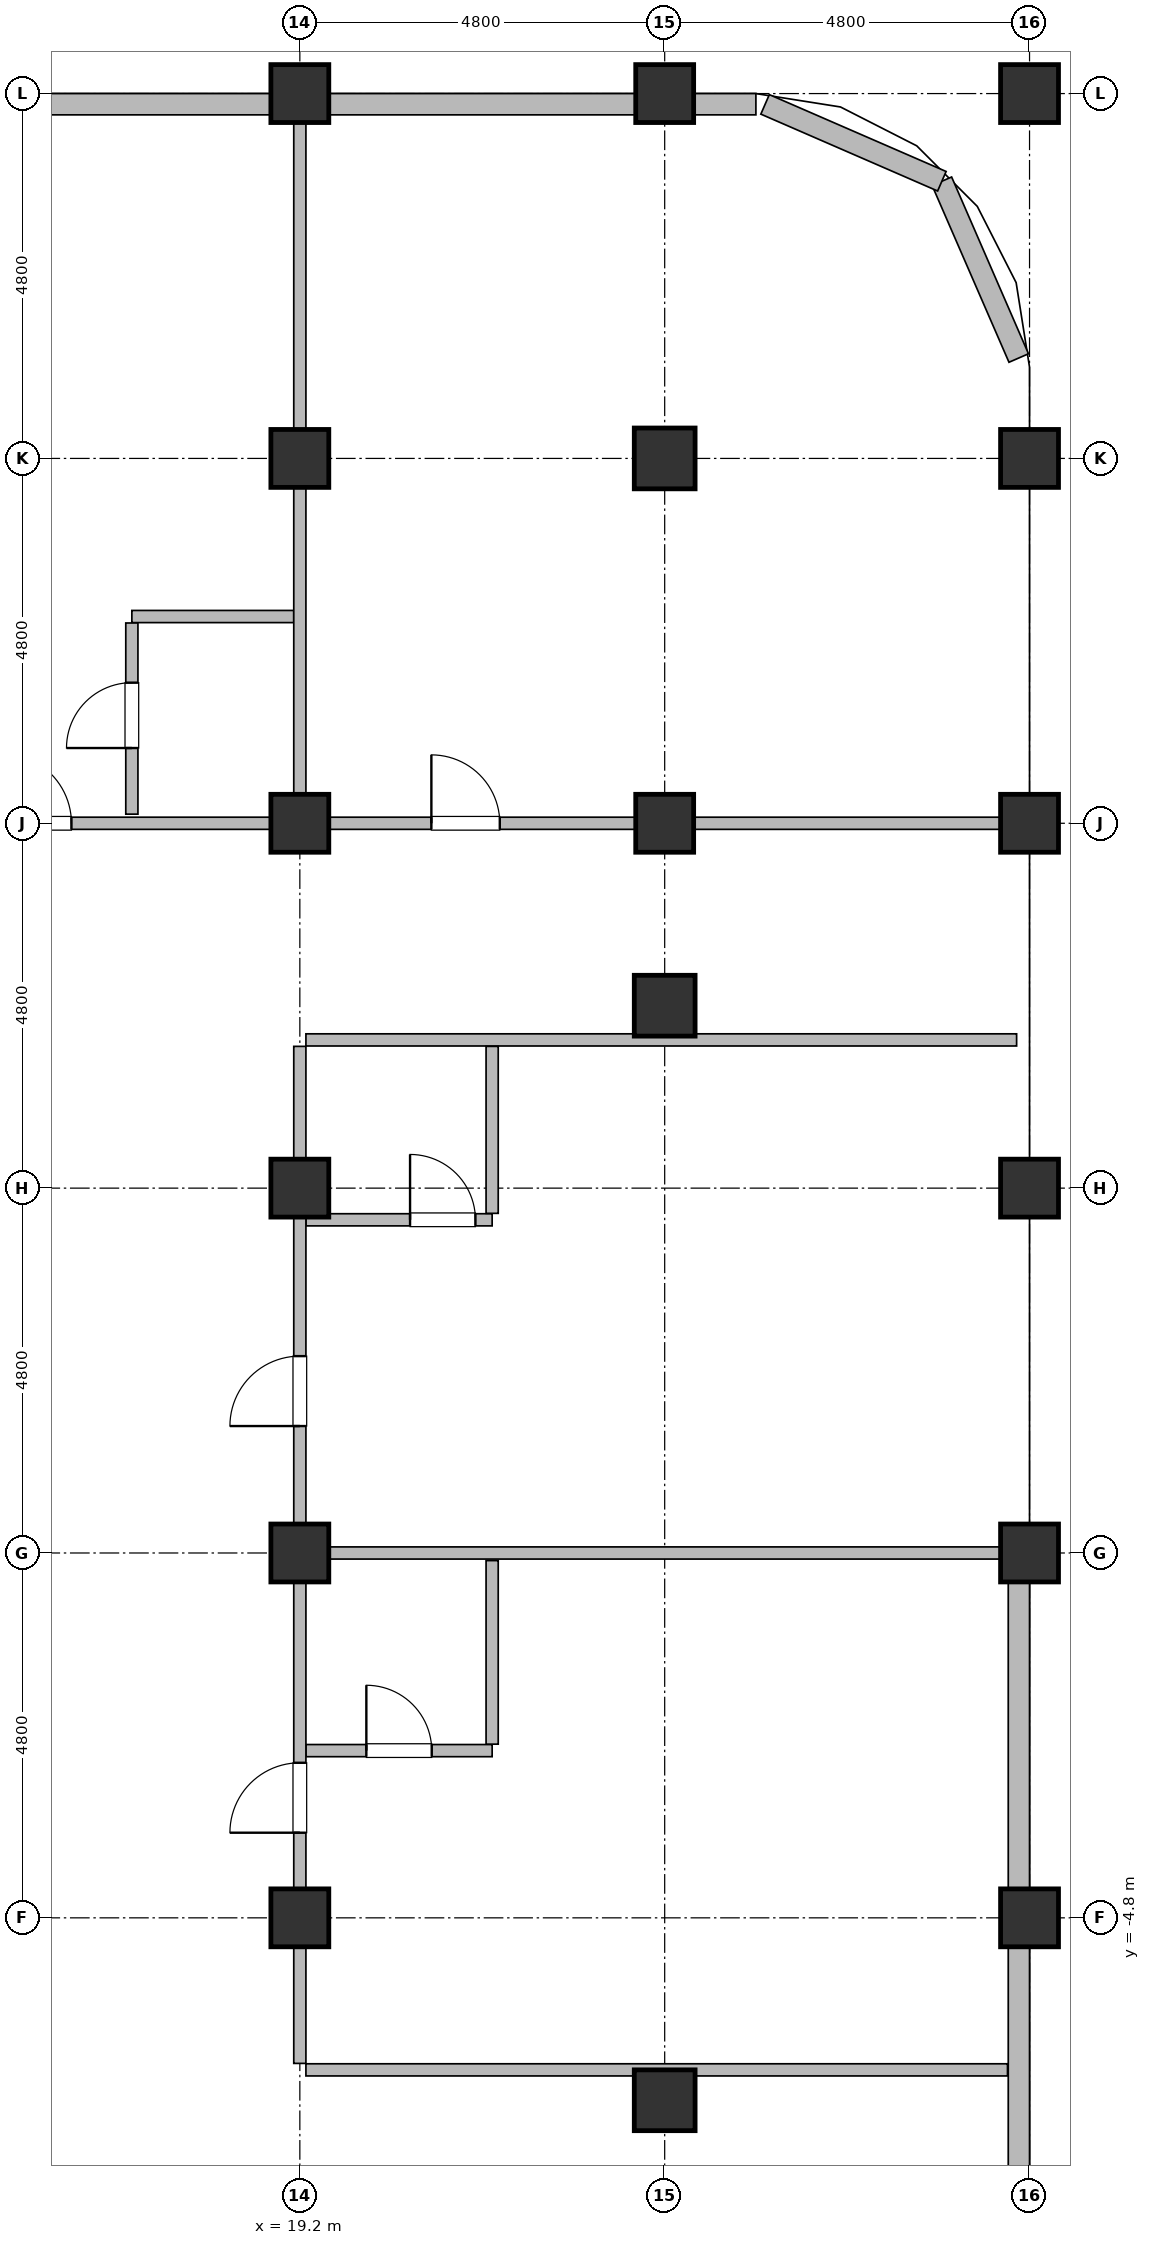
"""IFC4 building model, lengths in metres.
Left out: names, types, materials, properties, quantities, classifications, styles, units other than length and angle.
Written with IfcOpenShell. Run it as: python <this file> out.ifc"""

import sys

from ifc_helpers import new_model, si_unit, direction, frame, frame_2d, origin, origin_2d, place, context, subcontext, project, spatial, rectangle, hollow_rectangle, hollow_circle, extrude, element, fill, save


model = new_model("IFC4")
c1 = context("Model", 3, precision=1e-05, world=origin(), true_north=direction((0.0, 1.0)))
c2 = subcontext(c1, "Body", "Model", "MODEL_VIEW")
j1 = project(units=[si_unit("LENGTHUNIT", "METRE"), si_unit("PLANEANGLEUNIT", "RADIAN")], contexts=[c1])
p1 = place(None, origin())
s1 = spatial("IfcSite", under=j1, at=p1, CompositionType="ELEMENT")
p2 = place(p1, origin())
s2 = spatial("IfcBuilding", under=s1, at=p2, CompositionType="ELEMENT")
p3 = place(p2, frame((0.0, 0.0, 48.5)))
s3 = spatial("IfcBuildingStorey", under=s2, at=p3, CompositionType="ELEMENT", Elevation=48.5)
for number, where, z_axis, x_axis in (
    (1, (19.2, -4.8, 0.0), (0.0, 0.0, 1.0), (1.0, 0.0, 0.0)),
    (2, (19.2, 0.0, 0.0), (0.0, 0.0, 1.0), (1.0, 0.0, 0.0)),
    (3, (19.2, 4.8, 0.0), (0.0, 0.0, 1.0), (1.0, 0.0, 0.0)),
    (4, (19.2, 9.6, 0.0), (0.0, 0.0, 1.0), (1.0, 0.0, 0.0)),
    (5, (19.2, 14.4, 0.0), (0.0, 0.0, 1.0), (1.0, 0.0, 0.0)),
    (6, (19.2, 19.2, 0.0), (0.0, 0.0, 1.0), (1.0, 0.0, 0.0)),
):
    element("IfcColumn", number, at=place(p3, frame(where, z_axis=z_axis, x_axis=x_axis)), inside=s3, PredefinedType="COLUMN", context=c2, shape_type="SweptSolid", body=[
        extrude(hollow_circle(Radius=0.381, WallThickness=0.032, at=origin_2d()), origin(), (0.0, 0.0, 1.0), 3.7),
    ])
for number, where, z_axis, x_axis in (
    (7, (24.0, -7.2, 0.0), (0.0, 0.0, 1.0), (1.0, 0.0, 0.0)),
    (8, (24.0, 7.2, 0.0), (0.0, 0.0, 1.0), (1.0, 0.0, 0.0)),
):
    element("IfcColumn", number, at=place(p3, frame(where, z_axis=z_axis, x_axis=x_axis)), inside=s3, PredefinedType="COLUMN", context=c2, shape_type="SweptSolid", body=[
        extrude(hollow_rectangle(XDim=0.8, YDim=0.8, WallThickness=0.036, at=origin_2d()), origin(), (0.0, 0.0, 1.0), 3.7),
    ])
p4 = place(p3, frame((24.0, 9.6, 0.0), z_axis=(0.0, 0.0, 1.0), x_axis=(1.0, 0.0, 0.0)))
e9 = element("IfcColumn", 9, at=p4, inside=s3, PredefinedType="COLUMN", context=c2, shape_type="SweptSolid", body=[
    extrude(hollow_circle(Radius=0.381, WallThickness=0.032, at=origin_2d()), origin(), (0.0, 0.0, 1.0), 3.7),
])
p5 = place(p3, frame((24.0, 14.4, 0.0), z_axis=(0.0, 0.0, 1.0), x_axis=(1.0, 0.0, 0.0)))
e10 = element("IfcColumn", 10, at=p5, inside=s3, PredefinedType="COLUMN", context=c2, shape_type="SweptSolid", body=[
    extrude(hollow_rectangle(XDim=0.8, YDim=0.8, WallThickness=0.036, at=origin_2d()), origin(), (0.0, 0.0, 1.0), 3.7),
])
for number, where, z_axis, x_axis in (
    (11, (24.0, 19.2, 0.0), (0.0, 0.0, 1.0), (1.0, 0.0, 0.0)),
    (12, (28.8, -4.8, 0.0), (0.0, 0.0, 1.0), (1.0, 0.0, 0.0)),
    (13, (28.8, 0.0, 0.0), (0.0, 0.0, 1.0), (1.0, 0.0, 0.0)),
    (14, (28.8, 4.8, 0.0), (0.0, 0.0, 1.0), (1.0, 0.0, 0.0)),
    (15, (28.8, 9.6, 0.0), (0.0, 0.0, 1.0), (1.0, 0.0, 0.0)),
    (16, (28.8, 14.4, 0.0), (0.0, 0.0, 1.0), (1.0, 0.0, 0.0)),
    (17, (28.8, 19.2, 0.0), (0.0, 0.0, 1.0), (1.0, 0.0, 0.0)),
):
    element("IfcColumn", number, at=place(p3, frame(where, z_axis=z_axis, x_axis=x_axis)), inside=s3, PredefinedType="COLUMN", context=c2, shape_type="SweptSolid", body=[
        extrude(hollow_circle(Radius=0.381, WallThickness=0.032, at=origin_2d()), origin(), (0.0, 0.0, 1.0), 3.7),
    ])
p6 = place(p3, frame((28.658, 15.721, 0.0), z_axis=(0.0, 0.0, 1.0), x_axis=(-0.398792985289, 0.917040977756, 0.0)))
e18 = element("IfcWall", 18, at=p6, inside=s3, PredefinedType="SOLIDWALL", context=c2, shape_type="SweptSolid", body=[
    extrude(rectangle(XDim=2.536, YDim=0.28, at=frame_2d((1.268, 0.0))), origin(), (0.0, 0.0, 1.0), 2.82),
])
p7 = place(p3, frame((27.646, 18.047, 0.0), z_axis=(0.0, 0.0, 1.0), x_axis=(-0.917060872934, 0.398747232384, 0.0)))
e19 = element("IfcWall", 19, at=p7, inside=s3, PredefinedType="SOLIDWALL", context=c2, shape_type="SweptSolid", body=[
    extrude(rectangle(XDim=2.536, YDim=0.28, at=frame_2d((1.268, 0.0))), origin(), (0.0, 0.0, 1.0), 2.62),
])
p8 = place(p3, frame((4.75, 19.06, 0.0), z_axis=(0.0, 0.0, 1.0), x_axis=(1.0, 0.0, 0.0)))
e20 = element("IfcWall", 20, at=p8, inside=s3, PredefinedType="SOLIDWALL", context=c2, shape_type="SweptSolid", body=[
    extrude(rectangle(XDim=20.45, YDim=0.28, at=frame_2d((10.225, 0.0))), origin(), (0.0, 0.0, 1.0), 2.62),
])
p9 = place(p8, frame((6.35, 0.0, 0.75)))
e21 = element("IfcOpeningElement", 21, at=p9, cuts=e20, PredefinedType="OPENING", context=c2, shape_type="SweptSolid", body=[
    extrude(rectangle(XDim=1.8, YDim=1.7, at=frame_2d((0.9, 0.85))), frame((0.0, 0.155, 0.0), z_axis=(0.0, -1.0, 0.0), x_axis=(1.0, 0.0, 0.0)), (0.0, 0.0, 1.0), 0.31),
])
p10 = place(p8, frame((11.15, 0.0, 0.75)))
e22 = element("IfcOpeningElement", 22, at=p10, cuts=e20, PredefinedType="OPENING", context=c2, shape_type="SweptSolid", body=[
    extrude(rectangle(XDim=1.8, YDim=1.7, at=frame_2d((0.9, 0.85))), frame((0.0, 0.155, 0.0), z_axis=(0.0, -1.0, 0.0), x_axis=(1.0, 0.0, 0.0)), (0.0, 0.0, 1.0), 0.31),
])
p11 = place(p3, frame((28.66, -20.4, 0.0), z_axis=(0.0, 0.0, 1.0), x_axis=(0.0, 1.0, 0.0)))
e23 = element("IfcWall", 23, at=p11, inside=s3, PredefinedType="SOLIDWALL", context=c2, shape_type="SweptSolid", body=[
    extrude(rectangle(XDim=20.38, YDim=0.28, at=frame_2d((10.19, 0.0))), origin(), (0.0, 0.0, 1.0), 2.12),
])
p12 = place(p11, frame((17.25, 0.0, 0.75)))
e24 = element("IfcOpeningElement", 24, at=p12, cuts=e23, PredefinedType="OPENING", context=c2, shape_type="SweptSolid", body=[
    extrude(rectangle(XDim=1.5, YDim=1.15, at=frame_2d((0.75, 0.575))), frame((0.0, 0.155, 0.0), z_axis=(0.0, -1.0, 0.0), x_axis=(1.0, 0.0, 0.0)), (0.0, 0.0, 1.0), 0.31),
])
p13 = place(p3, frame((19.28, -6.8, 0.0), z_axis=(0.0, 0.0, 1.0), x_axis=(1.0, 0.0, 0.0)))
e25 = element("IfcWall", 25, at=p13, inside=s3, PredefinedType="PARTITIONING", context=c2, shape_type="SweptSolid", body=[
    extrude(rectangle(XDim=9.23, YDim=0.16, at=frame_2d((4.615, 0.0))), origin(), (0.0, 0.0, 1.0), 2.62),
])
p14 = place(p3, frame((19.28, -2.6, 0.0), z_axis=(0.0, 0.0, 1.0), x_axis=(1.0, 0.0, 0.0)))
e26 = element("IfcWall", 26, at=p14, inside=s3, PredefinedType="PARTITIONING", context=c2, shape_type="SweptSolid", body=[
    extrude(rectangle(XDim=2.45, YDim=0.16, at=frame_2d((1.225, 0.0))), origin(), (0.0, 0.0, 1.0), 2.82),
])
p15 = place(p14, frame((0.795, 0.0, 0.0)))
e27 = element("IfcOpeningElement", 27, at=p15, cuts=e26, PredefinedType="OPENING", context=c2, shape_type="SweptSolid", body=[
    extrude(rectangle(XDim=0.86, YDim=2.1, at=frame_2d((0.43, 1.05))), frame((0.0, 0.095, 0.0), z_axis=(0.0, -1.0, 0.0), x_axis=(1.0, 0.0, 0.0)), (0.0, 0.0, 1.0), 0.19),
])
p16 = place(p3, frame((19.28, 0.0, 0.0), z_axis=(0.0, 0.0, 1.0), x_axis=(1.0, 0.0, 0.0)))
e28 = element("IfcWall", 28, at=p16, inside=s3, PredefinedType="PARTITIONING", context=c2, shape_type="SweptSolid", body=[
    extrude(rectangle(XDim=9.35, YDim=0.16, at=frame_2d((4.675, 0.0))), origin(), (0.0, 0.0, 1.0), 2.82),
])
p17 = place(p3, frame((19.28, 4.383, 0.0), z_axis=(0.0, 0.0, 1.0), x_axis=(1.0, 0.0, 0.0)))
e29 = element("IfcWall", 29, at=p17, inside=s3, PredefinedType="PARTITIONING", context=c2, shape_type="SweptSolid", body=[
    extrude(rectangle(XDim=2.45, YDim=0.16, at=frame_2d((1.225, 0.0))), origin(), (0.0, 0.0, 1.0), 2.82),
])
p18 = place(p17, frame((1.37, 0.0, 0.0)))
e30 = element("IfcOpeningElement", 30, at=p18, cuts=e29, PredefinedType="OPENING", context=c2, shape_type="SweptSolid", body=[
    extrude(rectangle(XDim=0.86, YDim=2.1, at=frame_2d((0.43, 1.05))), frame((0.0, 0.095, 0.0), z_axis=(0.0, -1.0, 0.0), x_axis=(1.0, 0.0, 0.0)), (0.0, 0.0, 1.0), 0.19),
])
p19 = place(p3, frame((19.28, 6.75, 0.0), z_axis=(0.0, 0.0, 1.0), x_axis=(1.0, 0.0, 0.0)))
e31 = element("IfcWall", 31, at=p19, inside=s3, PredefinedType="PARTITIONING", context=c2, shape_type="SweptSolid", body=[
    extrude(rectangle(XDim=9.35, YDim=0.16, at=frame_2d((4.675, 0.0))), origin(), (0.0, 0.0, 1.0), 2.62),
])
p20 = place(p3, frame((-33.43, 9.6, 0.0), z_axis=(0.0, 0.0, 1.0), x_axis=(1.0, 0.0, 0.0)))
e32 = element("IfcWall", 32, at=p20, inside=s3, PredefinedType="PARTITIONING", context=c2, shape_type="SweptSolid", body=[
    extrude(rectangle(XDim=62.06, YDim=0.16, at=frame_2d((31.03, 0.0))), origin(), (0.0, 0.0, 1.0), 2.62),
])
p21 = place(p20, frame((6.8, 0.0, 0.0)))
e33 = element("IfcOpeningElement", 33, at=p21, cuts=e32, PredefinedType="OPENING", context=c2, shape_type="SweptSolid", body=[
    extrude(rectangle(XDim=0.9, YDim=2.1, at=frame_2d((0.45, 1.05))), frame((0.0, 0.095, 0.0), z_axis=(0.0, -1.0, 0.0), x_axis=(1.0, 0.0, 0.0)), (0.0, 0.0, 1.0), 0.19),
])
p22 = place(p20, frame((54.361, 0.0, 0.0)))
e34 = element("IfcOpeningElement", 34, at=p22, cuts=e32, PredefinedType="OPENING", context=c2, shape_type="SweptSolid", body=[
    extrude(rectangle(XDim=0.9, YDim=2.1, at=frame_2d((0.45, 1.05))), frame((0.0, 0.095, 0.0), z_axis=(0.0, -1.0, 0.0), x_axis=(1.0, 0.0, 0.0)), (0.0, 0.0, 1.0), 0.19),
])
p23 = place(p20, frame((10.69, 0.0, 0.0)))
e35 = element("IfcOpeningElement", 35, at=p23, cuts=e32, PredefinedType="OPENING", context=c2, shape_type="SweptSolid", body=[
    extrude(rectangle(XDim=0.9, YDim=2.1, at=frame_2d((0.45, 1.05))), frame((0.0, 0.095, 0.0), z_axis=(0.0, -1.0, 0.0), x_axis=(1.0, 0.0, 0.0)), (0.0, 0.0, 1.0), 0.19),
])
p24 = place(p20, frame((12.07, 0.0, 0.0)))
e36 = element("IfcOpeningElement", 36, at=p24, cuts=e32, PredefinedType="OPENING", context=c2, shape_type="SweptSolid", body=[
    extrude(rectangle(XDim=0.9, YDim=2.1, at=frame_2d((0.45, 1.05))), frame((0.0, 0.095, 0.0), z_axis=(0.0, -1.0, 0.0), x_axis=(1.0, 0.0, 0.0)), (0.0, 0.0, 1.0), 0.19),
])
p25 = place(p20, frame((15.6, 0.0, 0.0)))
e37 = element("IfcOpeningElement", 37, at=p25, cuts=e32, PredefinedType="OPENING", context=c2, shape_type="SweptSolid", body=[
    extrude(rectangle(XDim=0.92, YDim=2.15, at=frame_2d((0.46, 1.075))), frame((0.0, 0.095, 0.0), z_axis=(0.0, -1.0, 0.0), x_axis=(1.0, 0.0, 0.0)), (0.0, 0.0, 1.0), 0.19),
])
p26 = place(p20, frame((20.98, 0.0, 0.0)))
e38 = element("IfcOpeningElement", 38, at=p26, cuts=e32, PredefinedType="OPENING", context=c2, shape_type="SweptSolid", body=[
    extrude(rectangle(XDim=0.9, YDim=2.1, at=frame_2d((0.45, 1.05))), frame((0.0, 0.095, 0.0), z_axis=(0.0, -1.0, 0.0), x_axis=(1.0, 0.0, 0.0)), (0.0, 0.0, 1.0), 0.19),
])
p27 = place(p20, frame((35.38, 0.0, 0.0)))
e39 = element("IfcOpeningElement", 39, at=p27, cuts=e32, PredefinedType="OPENING", context=c2, shape_type="SweptSolid", body=[
    extrude(rectangle(XDim=0.9, YDim=2.1, at=frame_2d((0.45, 1.05))), frame((0.0, 0.095, 0.0), z_axis=(0.0, -1.0, 0.0), x_axis=(1.0, 0.0, 0.0)), (0.0, 0.0, 1.0), 0.19),
])
p28 = place(p20, frame((46.035, 0.0, 0.0)))
e40 = element("IfcOpeningElement", 40, at=p28, cuts=e32, PredefinedType="OPENING", context=c2, shape_type="SweptSolid", body=[
    extrude(rectangle(XDim=0.92, YDim=2.15, at=frame_2d((0.46, 1.075))), frame((0.0, 0.095, 0.0), z_axis=(0.0, -1.0, 0.0), x_axis=(1.0, 0.0, 0.0)), (0.0, 0.0, 1.0), 0.19),
])
p29 = place(p20, frame((48.705, 0.0, 0.0)))
e41 = element("IfcOpeningElement", 41, at=p29, cuts=e32, PredefinedType="OPENING", context=c2, shape_type="SweptSolid", body=[
    extrude(rectangle(XDim=0.92, YDim=2.15, at=frame_2d((0.46, 1.075))), frame((0.0, 0.095, 0.0), z_axis=(0.0, -1.0, 0.0), x_axis=(1.0, 0.0, 0.0)), (0.0, 0.0, 1.0), 0.19),
])
p30 = place(p3, frame((16.99, 12.32, 0.0), z_axis=(0.0, 0.0, 1.0), x_axis=(1.0, 0.0, 0.0)))
e42 = element("IfcWall", 42, at=p30, inside=s3, PredefinedType="PARTITIONING", context=c2, shape_type="SweptSolid", body=[
    extrude(rectangle(XDim=2.13, YDim=0.16, at=frame_2d((1.065, 0.0))), origin(), (0.0, 0.0, 1.0), 2.82),
])
p31 = place(p3, frame((16.99, 9.72, 0.0), z_axis=(0.0, 0.0, 1.0), x_axis=(0.0, 1.0, 0.0)))
e43 = element("IfcWall", 43, at=p31, inside=s3, PredefinedType="PARTITIONING", context=c2, shape_type="SweptSolid", body=[
    extrude(rectangle(XDim=2.515, YDim=0.16, at=frame_2d((1.258, 0.0))), origin(), (0.0, 0.0, 1.0), 2.62),
])
p32 = place(p31, frame((0.87, 0.0, 0.0)))
e44 = element("IfcOpeningElement", 44, at=p32, cuts=e43, PredefinedType="OPENING", context=c2, shape_type="SweptSolid", body=[
    extrude(rectangle(XDim=0.86, YDim=2.1, at=frame_2d((0.43, 1.05))), frame((0.0, 0.095, 0.0), z_axis=(0.0, -1.0, 0.0), x_axis=(1.0, 0.0, 0.0)), (0.0, 0.0, 1.0), 0.19),
])
p33 = place(p3, frame((19.2, -6.715, 0.0), z_axis=(0.0, 0.0, 1.0), x_axis=(0.0, 1.0, 0.0)))
e45 = element("IfcWall", 45, at=p33, inside=s3, PredefinedType="PARTITIONING", context=c2, shape_type="SweptSolid", body=[
    extrude(rectangle(XDim=13.38, YDim=0.16, at=frame_2d((6.69, 0.0))), origin(), (0.0, 0.0, 1.0), 2.62),
])
p34 = place(p33, frame((3.035, 0.0, 0.0)))
e46 = element("IfcOpeningElement", 46, at=p34, cuts=e45, PredefinedType="OPENING", context=c2, shape_type="SweptSolid", body=[
    extrude(rectangle(XDim=0.92, YDim=2.15, at=frame_2d((0.46, 1.075))), frame((0.0, 0.095, 0.0), z_axis=(0.0, -1.0, 0.0), x_axis=(1.0, 0.0, 0.0)), (0.0, 0.0, 1.0), 0.19),
])
p35 = place(p33, frame((8.385, 0.0, 0.0)))
e47 = element("IfcOpeningElement", 47, at=p35, cuts=e45, PredefinedType="OPENING", context=c2, shape_type="SweptSolid", body=[
    extrude(rectangle(XDim=0.92, YDim=2.15, at=frame_2d((0.46, 1.075))), frame((0.0, 0.095, 0.0), z_axis=(0.0, -1.0, 0.0), x_axis=(1.0, 0.0, 0.0)), (0.0, 0.0, 1.0), 0.19),
])
p36 = place(p3, frame((19.2, 9.72, 0.0), z_axis=(0.0, 0.0, 1.0), x_axis=(0.0, 1.0, 0.0)))
e48 = element("IfcWall", 48, at=p36, inside=s3, PredefinedType="PARTITIONING", context=c2, shape_type="SweptSolid", body=[
    extrude(rectangle(XDim=9.19, YDim=0.16, at=frame_2d((4.595, 0.0))), origin(), (0.0, 0.0, 1.0), 2.62),
])
p37 = place(p3, frame((21.73, -2.515, 0.0), z_axis=(0.0, 0.0, 1.0), x_axis=(0.0, 1.0, 0.0)))
e49 = element("IfcWall", 49, at=p37, inside=s3, PredefinedType="PARTITIONING", context=c2, shape_type="SweptSolid", body=[
    extrude(rectangle(XDim=2.415, YDim=0.16, at=frame_2d((1.208, 0.0))), origin(), (0.0, 0.0, 1.0), 3.52),
])
p38 = place(p3, frame((21.73, 4.468, 0.0), z_axis=(0.0, 0.0, 1.0), x_axis=(0.0, 1.0, 0.0)))
e50 = element("IfcWall", 50, at=p38, inside=s3, PredefinedType="PARTITIONING", context=c2, shape_type="SweptSolid", body=[
    extrude(rectangle(XDim=2.197, YDim=0.16, at=frame_2d((1.098, 0.0))), origin(), (0.0, 0.0, 1.0), 3.52),
])
p39 = place(p12, origin())
e51 = element("IfcWindow", 51, at=p39, inside=s3, PartitioningType="SINGLE_PANEL", PredefinedType="WINDOW", context=c2, shape_type="SweptSolid", body=[
    extrude(rectangle(XDim=1.5, YDim=1.15, at=frame_2d((0.75, 0.575))), frame((0.0, 0.03, 0.0), z_axis=(0.0, -1.0, 0.0), x_axis=(1.0, 0.0, 0.0)), (0.0, 0.0, 1.0), 0.06),
])
fill(e24, e51)
p40 = place(p10, origin())
e52 = element("IfcWindow", 52, at=p40, inside=s3, PartitioningType="SINGLE_PANEL", PredefinedType="WINDOW", context=c2, shape_type="SweptSolid", body=[
    extrude(rectangle(XDim=1.8, YDim=1.7, at=frame_2d((0.9, 0.85))), frame((0.0, 0.03, 0.0), z_axis=(0.0, -1.0, 0.0), x_axis=(1.0, 0.0, 0.0)), (0.0, 0.0, 1.0), 0.06),
])
fill(e22, e52)
p41 = place(p22, origin())
e53 = element("IfcDoor", 53, at=p41, inside=s3, OperationType="SINGLE_SWING_LEFT", PredefinedType="DOOR", context=c2, shape_type="SweptSolid", body=[
    extrude(rectangle(XDim=0.9, YDim=2.1, at=frame_2d((0.45, 1.05))), frame((0.0, 0.025, 0.0), z_axis=(0.0, -1.0, 0.0), x_axis=(1.0, 0.0, 0.0)), (0.0, 0.0, 1.0), 0.05),
])
fill(e34, e53)
p42 = place(p34, origin())
e54 = element("IfcDoor", 54, at=p42, inside=s3, OperationType="SINGLE_SWING_LEFT", PredefinedType="DOOR", context=c2, shape_type="SweptSolid", body=[
    extrude(rectangle(XDim=0.92, YDim=2.15, at=frame_2d((0.46, 1.075))), frame((0.0, 0.025, 0.0), z_axis=(0.0, -1.0, 0.0), x_axis=(1.0, 0.0, 0.0)), (0.0, 0.0, 1.0), 0.05),
])
fill(e46, e54)
p43 = place(p15, origin())
e55 = element("IfcDoor", 55, at=p43, inside=s3, OperationType="SINGLE_SWING_RIGHT", PredefinedType="DOOR", context=c2, shape_type="SweptSolid", body=[
    extrude(rectangle(XDim=0.86, YDim=2.1, at=frame_2d((0.43, 1.05))), frame((0.0, 0.025, 0.0), z_axis=(0.0, -1.0, 0.0), x_axis=(1.0, 0.0, 0.0)), (0.0, 0.0, 1.0), 0.05),
])
fill(e27, e55)
p44 = place(p35, origin())
e56 = element("IfcDoor", 56, at=p44, inside=s3, OperationType="SINGLE_SWING_LEFT", PredefinedType="DOOR", context=c2, shape_type="SweptSolid", body=[
    extrude(rectangle(XDim=0.92, YDim=2.15, at=frame_2d((0.46, 1.075))), frame((0.0, 0.025, 0.0), z_axis=(0.0, -1.0, 0.0), x_axis=(1.0, 0.0, 0.0)), (0.0, 0.0, 1.0), 0.05),
])
fill(e47, e56)
p45 = place(p18, origin())
e57 = element("IfcDoor", 57, at=p45, inside=s3, OperationType="SINGLE_SWING_LEFT", PredefinedType="DOOR", context=c2, shape_type="SweptSolid", body=[
    extrude(rectangle(XDim=0.86, YDim=2.1, at=frame_2d((0.43, 1.05))), frame((0.0, 0.025, 0.0), z_axis=(0.0, -1.0, 0.0), x_axis=(1.0, 0.0, 0.0)), (0.0, 0.0, 1.0), 0.05),
])
fill(e30, e57)
p46 = place(p29, origin())
e58 = element("IfcDoor", 58, at=p46, inside=s3, OperationType="SINGLE_SWING_RIGHT", PredefinedType="DOOR", context=c2, shape_type="SweptSolid", body=[
    extrude(rectangle(XDim=0.92, YDim=2.15, at=frame_2d((0.46, 1.075))), frame((0.0, 0.025, 0.0), z_axis=(0.0, -1.0, 0.0), x_axis=(1.0, 0.0, 0.0)), (0.0, 0.0, 1.0), 0.05),
])
fill(e41, e58)
p47 = place(p32, origin())
e59 = element("IfcDoor", 59, at=p47, inside=s3, OperationType="SINGLE_SWING_LEFT", PredefinedType="DOOR", context=c2, shape_type="SweptSolid", body=[
    extrude(rectangle(XDim=0.86, YDim=2.1, at=frame_2d((0.43, 1.05))), frame((0.0, 0.025, 0.0), z_axis=(0.0, -1.0, 0.0), x_axis=(1.0, 0.0, 0.0)), (0.0, 0.0, 1.0), 0.05),
])
fill(e44, e59)
save(model, sys.argv[1])
